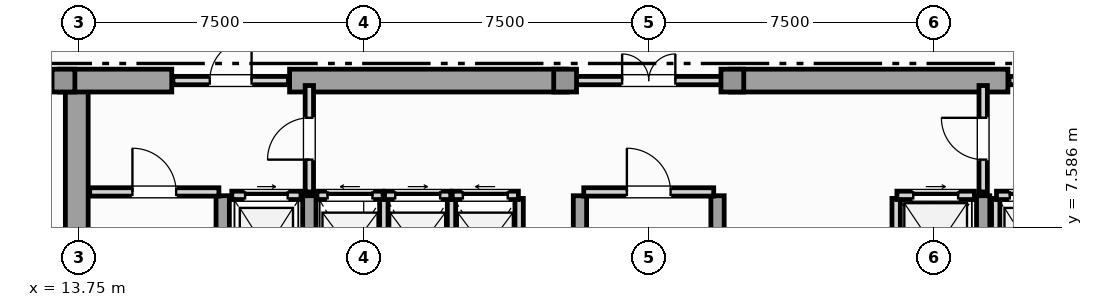
"""IFC4 building model, lengths in metres.
Left out: names, types, materials, properties, quantities, classifications, styles, units other than length and angle.
Written with IfcOpenShell. Run it as: python <this file> out.ifc"""

import sys

from ifc_helpers import new_model, si_unit, direction, frame, frame_2d, origin, origin_2d, place, context, subcontext, project, spatial, rectangle, extrude, element, fill, save


model = new_model("IFC4")
c1 = context("Model", 3, precision=1e-05, world=origin(), true_north=direction((0.0, 1.0)))
c2 = subcontext(c1, "Body", "Model", "MODEL_VIEW")
j1 = project(units=[si_unit("LENGTHUNIT", "METRE"), si_unit("PLANEANGLEUNIT", "RADIAN")], contexts=[c1])
p1 = place(None, origin())
s1 = spatial("IfcSite", under=j1, at=p1, CompositionType="ELEMENT")
p2 = place(p1, origin())
s2 = spatial("IfcBuilding", under=s1, at=p2, CompositionType="ELEMENT")
p3 = place(p2, frame((0.0, 0.0, 268.3)))
s3 = spatial("IfcBuildingStorey", under=s2, at=p3, CompositionType="ELEMENT", Elevation=268.3)
p4 = place(p3, frame((13.7, 0.92, 0.0), z_axis=(0.0, 0.0, 1.0), x_axis=(0.0, 1.0, 0.0)))
e1 = element("IfcWall", 1, at=p4, inside=s3, PredefinedType="SHEAR", context=c2, shape_type="SweptSolid", body=[
    extrude(rectangle(XDim=10.53, YDim=0.6, at=frame_2d((5.265, 0.0))), origin(), (0.0, 0.0, 1.0), 3.65),
])
p5 = place(p3, frame((13.25, 11.45, 0.0), z_axis=(0.0, 0.0, 1.0), x_axis=(1.0, 0.0, 0.0)))
e2 = element("IfcWall", 2, at=p5, inside=s3, PredefinedType="SHEAR", context=c2, shape_type="SweptSolid", body=[
    extrude(rectangle(XDim=2.95, YDim=0.6, at=frame_2d((1.475, 0.0))), origin(), (0.0, 0.0, 1.0), 3.65),
])
for number, where, z_axis, x_axis in (
    (3, (19.3, 11.45, 0.0), (0.0, 0.0, 1.0), (1.0, 0.0, 0.0)),
    (4, (30.9, 11.45, 0.0), (0.0, 0.0, 1.0), (1.0, 0.0, 0.0)),
):
    element("IfcWall", number, at=place(p3, frame(where, z_axis=z_axis, x_axis=x_axis)), inside=s3, PredefinedType="SHEAR", context=c2, shape_type="SweptSolid", body=[
        extrude(rectangle(XDim=7.3, YDim=0.6, at=frame_2d((3.65, 0.0))), origin(), (0.0, 0.0, 1.0), 3.65),
    ])
for number, where, z_axis, x_axis in (
    (5, (17.54, 0.92, 0.0), (0.0, 0.0, 1.0), (0.0, 1.0, 0.0)),
    (6, (19.82, 0.92, 0.0), (0.0, 0.0, 1.0), (0.0, 1.0, 0.0)),
    (7, (26.94, 0.92, 0.0), (0.0, 0.0, 1.0), (0.0, 1.0, 0.0)),
    (8, (30.56, 0.92, 0.0), (0.0, 0.0, 1.0), (0.0, 1.0, 0.0)),
    (9, (37.55, 0.92, 0.0), (0.0, 0.0, 1.0), (0.0, 1.0, 0.0)),
):
    element("IfcWall", number, at=place(p3, frame(where, z_axis=z_axis, x_axis=x_axis)), inside=s3, PredefinedType="SHEAR", context=c2, shape_type="SweptSolid", body=[
        extrude(rectangle(XDim=7.5, YDim=0.35, at=frame_2d((3.75, 0.0))), origin(), (0.0, 0.0, 1.0), 3.65),
    ])
for number, where, z_axis, x_axis in (
    (10, (13.35, 11.45, 0.0), (0.0, 0.0, 1.0), (1.0, 0.0, 0.0)),
    (11, (26.55, 11.45, 0.0), (0.0, 0.0, 1.0), (1.0, 0.0, 0.0)),
    (12, (30.95, 11.45, 0.0), (0.0, 0.0, 1.0), (1.0, 0.0, 0.0)),
):
    element("IfcColumn", number, at=place(p3, frame(where, z_axis=z_axis, x_axis=x_axis)), inside=s3, PredefinedType="COLUMN", context=c2, shape_type="SweptSolid", body=[
        extrude(rectangle(XDim=0.6, YDim=0.6, at=origin_2d()), origin(), (0.0, 0.0, 1.0), 3.85),
    ])
p6 = place(p3, frame((17.78, 8.43, 0.0), z_axis=(0.0, 0.0, 1.0), x_axis=(1.0, 0.0, 0.0)))
e13 = element("IfcWall", 13, at=p6, inside=s3, PredefinedType="SOLIDWALL", context=c2, shape_type="SweptSolid", body=[
    extrude(rectangle(XDim=1.82, YDim=0.22, at=frame_2d((0.91, 0.0))), origin(), (0.0, 0.0, 1.0), 3.65),
])
p7 = place(p6, frame((0.35, 0.0, 0.0)))
e14 = element("IfcOpeningElement", 14, at=p7, cuts=e13, PredefinedType="OPENING", context=c2, shape_type="SweptSolid", body=[
    extrude(rectangle(XDim=1.12, YDim=2.25, at=frame_2d((0.56, 1.125))), frame((0.0, 0.12, 0.0), z_axis=(0.0, -1.0, 0.0), x_axis=(1.0, 0.0, 0.0)), (0.0, 0.0, 1.0), 0.24),
])
p8 = place(p3, frame((37.88, 5.65, 0.0), z_axis=(0.0, 0.0, 1.0), x_axis=(0.0, 1.0, 0.0)))
e15 = element("IfcWall", 15, at=p8, inside=s3, PredefinedType="SOLIDWALL", context=c2, shape_type="SweptSolid", body=[
    extrude(rectangle(XDim=2.7, YDim=0.22, at=frame_2d((1.35, 0.0))), origin(), (0.0, 0.0, 1.0), 3.65),
])
p9 = place(p3, frame((37.9, 8.43, 0.0), z_axis=(0.0, 0.0, 1.0), x_axis=(1.0, 0.0, 0.0)))
e16 = element("IfcWall", 16, at=p9, inside=s3, PredefinedType="SOLIDWALL", context=c2, shape_type="SweptSolid", body=[
    extrude(rectangle(XDim=1.82, YDim=0.22, at=frame_2d((0.91, 0.0))), origin(), (0.0, 0.0, 1.0), 3.65),
])
p10 = place(p9, frame((0.35, 0.0, 0.0)))
e17 = element("IfcOpeningElement", 17, at=p10, cuts=e16, PredefinedType="OPENING", context=c2, shape_type="SweptSolid", body=[
    extrude(rectangle(XDim=1.12, YDim=2.25, at=frame_2d((0.56, 1.125))), frame((0.0, 0.12, 0.0), z_axis=(0.0, -1.0, 0.0), x_axis=(1.0, 0.0, 0.0)), (0.0, 0.0, 1.0), 0.24),
])
p11 = place(p3, frame((35.26, 5.65, 0.0), z_axis=(0.0, 0.0, 1.0), x_axis=(0.0, 1.0, 0.0)))
e18 = element("IfcWall", 18, at=p11, inside=s3, PredefinedType="SOLIDWALL", context=c2, shape_type="SweptSolid", body=[
    extrude(rectangle(XDim=2.7, YDim=0.22, at=frame_2d((1.35, 0.0))), origin(), (0.0, 0.0, 1.0), 3.65),
])
p12 = place(p3, frame((35.28, 8.43, 0.0), z_axis=(0.0, 0.0, 1.0), x_axis=(1.0, 0.0, 0.0)))
e19 = element("IfcWall", 19, at=p12, inside=s3, PredefinedType="SOLIDWALL", context=c2, shape_type="SweptSolid", body=[
    extrude(rectangle(XDim=2.04, YDim=0.22, at=frame_2d((1.02, 0.0))), origin(), (0.0, 0.0, 1.0), 3.65),
])
p13 = place(p12, frame((0.43, 0.0, 0.0)))
e20 = element("IfcOpeningElement", 20, at=p13, cuts=e19, PredefinedType="OPENING", context=c2, shape_type="SweptSolid", body=[
    extrude(rectangle(XDim=1.18, YDim=2.2, at=frame_2d((0.59, 1.1))), frame((0.0, 0.12, 0.0), z_axis=(0.0, -1.0, 0.0), x_axis=(1.0, 0.0, 0.0)), (0.0, 0.0, 1.0), 0.24),
])
p14 = place(p3, frame((21.78, 5.65, 0.0), z_axis=(0.0, 0.0, 1.0), x_axis=(0.0, 1.0, 0.0)))
e21 = element("IfcWall", 21, at=p14, inside=s3, PredefinedType="SOLIDWALL", context=c2, shape_type="SweptSolid", body=[
    extrude(rectangle(XDim=2.7, YDim=0.22, at=frame_2d((1.35, 0.0))), origin(), (0.0, 0.0, 1.0), 3.65),
])
p15 = place(p3, frame((20.02, 8.43, 0.0), z_axis=(0.0, 0.0, 1.0), x_axis=(1.0, 0.0, 0.0)))
e22 = element("IfcWall", 22, at=p15, inside=s3, PredefinedType="SOLIDWALL", context=c2, shape_type="SweptSolid", body=[
    extrude(rectangle(XDim=1.74, YDim=0.22, at=frame_2d((0.87, 0.0))), origin(), (0.0, 0.0, 1.0), 3.65),
])
p16 = place(p15, frame((0.28, 0.0, 0.0)))
e23 = element("IfcOpeningElement", 23, at=p16, cuts=e22, PredefinedType="OPENING", context=c2, shape_type="SweptSolid", body=[
    extrude(rectangle(XDim=1.18, YDim=2.2, at=frame_2d((0.59, 1.1))), frame((0.0, 0.12, 0.0), z_axis=(0.0, -1.0, 0.0), x_axis=(1.0, 0.0, 0.0)), (0.0, 0.0, 1.0), 0.24),
])
p17 = place(p3, frame((23.56, 5.65, 0.0), z_axis=(0.0, 0.0, 1.0), x_axis=(0.0, 1.0, 0.0)))
e24 = element("IfcWall", 24, at=p17, inside=s3, PredefinedType="SOLIDWALL", context=c2, shape_type="SweptSolid", body=[
    extrude(rectangle(XDim=2.7, YDim=0.22, at=frame_2d((1.35, 0.0))), origin(), (0.0, 0.0, 1.0), 3.65),
])
p18 = place(p3, frame((21.8, 8.43, 0.0), z_axis=(0.0, 0.0, 1.0), x_axis=(1.0, 0.0, 0.0)))
e25 = element("IfcWall", 25, at=p18, inside=s3, PredefinedType="SOLIDWALL", context=c2, shape_type="SweptSolid", body=[
    extrude(rectangle(XDim=1.74, YDim=0.22, at=frame_2d((0.87, 0.0))), origin(), (0.0, 0.0, 1.0), 3.65),
])
p19 = place(p18, frame((0.28, 0.0, 0.0)))
e26 = element("IfcOpeningElement", 26, at=p19, cuts=e25, PredefinedType="OPENING", context=c2, shape_type="SweptSolid", body=[
    extrude(rectangle(XDim=1.18, YDim=2.2, at=frame_2d((0.59, 1.1))), frame((0.0, 0.12, 0.0), z_axis=(0.0, -1.0, 0.0), x_axis=(1.0, 0.0, 0.0)), (0.0, 0.0, 1.0), 0.24),
])
p20 = place(p3, frame((25.34, 5.65, 0.0), z_axis=(0.0, 0.0, 1.0), x_axis=(0.0, 1.0, 0.0)))
e27 = element("IfcWall", 27, at=p20, inside=s3, PredefinedType="SOLIDWALL", context=c2, shape_type="SweptSolid", body=[
    extrude(rectangle(XDim=2.7, YDim=0.22, at=frame_2d((1.35, 0.0))), origin(), (0.0, 0.0, 1.0), 3.65),
])
p21 = place(p3, frame((23.58, 8.43, 0.0), z_axis=(0.0, 0.0, 1.0), x_axis=(1.0, 0.0, 0.0)))
e28 = element("IfcWall", 28, at=p21, inside=s3, PredefinedType="SOLIDWALL", context=c2, shape_type="SweptSolid", body=[
    extrude(rectangle(XDim=1.74, YDim=0.22, at=frame_2d((0.87, 0.0))), origin(), (0.0, 0.0, 1.0), 3.65),
])
p22 = place(p21, frame((0.28, 0.0, 0.0)))
e29 = element("IfcOpeningElement", 29, at=p22, cuts=e28, PredefinedType="OPENING", context=c2, shape_type="SweptSolid", body=[
    extrude(rectangle(XDim=1.18, YDim=2.2, at=frame_2d((0.59, 1.1))), frame((0.0, 0.12, 0.0), z_axis=(0.0, -1.0, 0.0), x_axis=(1.0, 0.0, 0.0)), (0.0, 0.0, 1.0), 0.24),
])
p23 = place(p3, frame((14.04, 8.52, 0.0), z_axis=(0.0, 0.0, 1.0), x_axis=(1.0, 0.0, 0.0)))
e30 = element("IfcWall", 30, at=p23, inside=s3, PredefinedType="SOLIDWALL", context=c2, shape_type="SweptSolid", body=[
    extrude(rectangle(XDim=3.4, YDim=0.22, at=frame_2d((1.7, 0.0))), origin(), (0.0, 0.0, 1.0), 3.65),
])
p24 = place(p23, frame((1.125, 0.0, 0.0)))
e31 = element("IfcOpeningElement", 31, at=p24, cuts=e30, PredefinedType="OPENING", context=c2, shape_type="SweptSolid", body=[
    extrude(rectangle(XDim=1.15, YDim=2.2, at=frame_2d((0.575, 1.1))), frame((0.0, 0.12, 0.0), z_axis=(0.0, -1.0, 0.0), x_axis=(1.0, 0.0, 0.0)), (0.0, 0.0, 1.0), 0.24),
])
p25 = place(p3, frame((27.04, 8.52, 0.0), z_axis=(0.0, 0.0, 1.0), x_axis=(1.0, 0.0, 0.0)))
e32 = element("IfcWall", 32, at=p25, inside=s3, PredefinedType="SOLIDWALL", context=c2, shape_type="SweptSolid", body=[
    extrude(rectangle(XDim=3.42, YDim=0.22, at=frame_2d((1.71, 0.0))), origin(), (0.0, 0.0, 1.0), 3.65),
])
p26 = place(p25, frame((1.135, 0.0, 0.0)))
e33 = element("IfcOpeningElement", 33, at=p26, cuts=e32, PredefinedType="OPENING", context=c2, shape_type="SweptSolid", body=[
    extrude(rectangle(XDim=1.15, YDim=2.2, at=frame_2d((0.575, 1.1))), frame((0.0, 0.12, 0.0), z_axis=(0.0, -1.0, 0.0), x_axis=(1.0, 0.0, 0.0)), (0.0, 0.0, 1.0), 0.24),
])
p27 = place(p3, frame((19.82, 8.52, 0.0), z_axis=(0.0, 0.0, 1.0), x_axis=(0.0, 1.0, 0.0)))
e34 = element("IfcWall", 34, at=p27, inside=s3, PredefinedType="SOLIDWALL", context=c2, shape_type="SweptSolid", body=[
    extrude(rectangle(XDim=2.8, YDim=0.22, at=frame_2d((1.4, 0.0))), origin(), (0.0, 0.0, 1.0), 3.105),
])
p28 = place(p27, frame((0.85, 0.0, 0.0)))
e35 = element("IfcOpeningElement", 35, at=p28, cuts=e34, PredefinedType="OPENING", context=c2, shape_type="SweptSolid", body=[
    extrude(rectangle(XDim=1.1, YDim=2.2, at=frame_2d((0.55, 1.1))), frame((0.0, 0.12, 0.0), z_axis=(0.0, -1.0, 0.0), x_axis=(1.0, 0.0, 0.0)), (0.0, 0.0, 1.0), 0.24),
])
p29 = place(p3, frame((37.55, 8.52, 0.0), z_axis=(0.0, 0.0, 1.0), x_axis=(0.0, 1.0, 0.0)))
e36 = element("IfcWall", 36, at=p29, inside=s3, PredefinedType="SOLIDWALL", context=c2, shape_type="SweptSolid", body=[
    extrude(rectangle(XDim=2.8, YDim=0.22, at=frame_2d((1.4, 0.0))), origin(), (0.0, 0.0, 1.0), 3.105),
])
p30 = place(p29, frame((0.85, 0.0, 0.0)))
e37 = element("IfcOpeningElement", 37, at=p30, cuts=e36, PredefinedType="OPENING", context=c2, shape_type="SweptSolid", body=[
    extrude(rectangle(XDim=1.1, YDim=2.2, at=frame_2d((0.55, 1.1))), frame((0.0, 0.12, 0.0), z_axis=(0.0, -1.0, 0.0), x_axis=(1.0, 0.0, 0.0)), (0.0, 0.0, 1.0), 0.24),
])
p31 = place(p3, frame((16.23, 11.45, 0.0), z_axis=(0.0, 0.0, 1.0), x_axis=(1.0, 0.0, 0.0)))
e38 = element("IfcWall", 38, at=p31, inside=s3, PredefinedType="SOLIDWALL", context=c2, shape_type="SweptSolid", body=[
    extrude(rectangle(XDim=3.04, YDim=0.22, at=frame_2d((1.52, 0.0))), origin(), (0.0, 0.0, 1.0), 3.65),
])
p32 = place(p31, frame((0.97, 0.0, 0.0)))
e39 = element("IfcOpeningElement", 39, at=p32, cuts=e38, PredefinedType="OPENING", context=c2, shape_type="SweptSolid", body=[
    extrude(rectangle(XDim=1.1, YDim=2.2, at=frame_2d((0.55, 1.1))), frame((0.0, 0.12, 0.0), z_axis=(0.0, -1.0, 0.0), x_axis=(1.0, 0.0, 0.0)), (0.0, 0.0, 1.0), 0.24),
])
p33 = place(p3, frame((26.63, 11.45, 0.0), z_axis=(0.0, 0.0, 1.0), x_axis=(1.0, 0.0, 0.0)))
e40 = element("IfcWall", 40, at=p33, inside=s3, PredefinedType="SOLIDWALL", context=c2, shape_type="SweptSolid", body=[
    extrude(rectangle(XDim=4.24, YDim=0.22, at=frame_2d((2.12, 0.0))), origin(), (0.0, 0.0, 1.0), 3.65),
])
p34 = place(p33, frame((1.42, 0.0, 0.0)))
e41 = element("IfcOpeningElement", 41, at=p34, cuts=e40, PredefinedType="OPENING", context=c2, shape_type="SweptSolid", body=[
    extrude(rectangle(XDim=1.4, YDim=2.2, at=frame_2d((0.7, 1.1))), frame((0.0, 0.12, 0.0), z_axis=(0.0, -1.0, 0.0), x_axis=(1.0, 0.0, 0.0)), (0.0, 0.0, 1.0), 0.24),
])
p35 = place(p3, frame((38.23, 11.45, 0.0), z_axis=(0.0, 0.0, 1.0), x_axis=(1.0, 0.0, 0.0)))
e42 = element("IfcWall", 42, at=p35, inside=s3, PredefinedType="SOLIDWALL", context=c2, shape_type="SweptSolid", body=[
    extrude(rectangle(XDim=3.04, YDim=0.22, at=frame_2d((1.52, 0.0))), origin(), (0.0, 0.0, 1.0), 3.65),
])
p36 = place(p35, frame((0.97, 0.0, 0.0)))
e43 = element("IfcOpeningElement", 43, at=p36, cuts=e42, PredefinedType="OPENING", context=c2, shape_type="SweptSolid", body=[
    extrude(rectangle(XDim=1.1, YDim=2.2, at=frame_2d((0.55, 1.1))), frame((0.0, 0.12, 0.0), z_axis=(0.0, -1.0, 0.0), x_axis=(1.0, 0.0, 0.0)), (0.0, 0.0, 1.0), 0.24),
])
p37 = place(p3, frame((8.289, 11.6, 0.0), z_axis=(0.0, 0.0, 1.0), x_axis=(1.0, 0.0, 0.0)))
e44 = element("IfcWall", 44, at=p37, inside=s3, PredefinedType="PARTITIONING", context=c2, shape_type="SweptSolid", body=[
    extrude(rectangle(XDim=4.856, YDim=0.18, at=frame_2d((2.428, 0.0))), origin(), (0.0, 0.0, 1.0), 3.65),
])
p38 = place(p37, frame((1.928, 0.0, 0.0)))
e45 = element("IfcOpeningElement", 45, at=p38, cuts=e44, PredefinedType="OPENING", context=c2, shape_type="SweptSolid", body=[
    extrude(rectangle(XDim=1.0, YDim=2.15, at=frame_2d((0.5, 1.075))), frame((0.0, 0.1, 0.0), z_axis=(0.0, -1.0, 0.0), x_axis=(1.0, 0.0, 0.0)), (0.0, 0.0, 1.0), 0.2),
])
p39 = place(p7, origin())
e46 = element("IfcDoor", 46, at=p39, inside=s3, OperationType="SLIDING_TO_RIGHT", PredefinedType="DOOR", context=c2, shape_type="SweptSolid", body=[
    extrude(rectangle(XDim=1.12, YDim=2.25, at=frame_2d((0.56, 1.125))), frame((0.0, 0.025, 0.0), z_axis=(0.0, -1.0, 0.0), x_axis=(1.0, 0.0, 0.0)), (0.0, 0.0, 1.0), 0.05),
])
fill(e14, e46)
p40 = place(p10, origin())
e47 = element("IfcDoor", 47, at=p40, inside=s3, OperationType="SLIDING_TO_LEFT", PredefinedType="DOOR", context=c2, shape_type="SweptSolid", body=[
    extrude(rectangle(XDim=1.12, YDim=2.25, at=frame_2d((0.56, 1.125))), frame((0.0, 0.025, 0.0), z_axis=(0.0, -1.0, 0.0), x_axis=(1.0, 0.0, 0.0)), (0.0, 0.0, 1.0), 0.05),
])
fill(e17, e47)
p41 = place(p13, origin())
e48 = element("IfcDoor", 48, at=p41, inside=s3, OperationType="SLIDING_TO_RIGHT", PredefinedType="DOOR", context=c2, shape_type="SweptSolid", body=[
    extrude(rectangle(XDim=1.18, YDim=2.2, at=frame_2d((0.59, 1.1))), frame((0.0, 0.025, 0.0), z_axis=(0.0, -1.0, 0.0), x_axis=(1.0, 0.0, 0.0)), (0.0, 0.0, 1.0), 0.05),
])
fill(e20, e48)
p42 = place(p16, origin())
e49 = element("IfcDoor", 49, at=p42, inside=s3, OperationType="SLIDING_TO_LEFT", PredefinedType="DOOR", context=c2, shape_type="SweptSolid", body=[
    extrude(rectangle(XDim=1.18, YDim=2.2, at=frame_2d((0.59, 1.1))), frame((0.0, 0.025, 0.0), z_axis=(0.0, -1.0, 0.0), x_axis=(1.0, 0.0, 0.0)), (0.0, 0.0, 1.0), 0.05),
])
fill(e23, e49)
p43 = place(p19, origin())
e50 = element("IfcDoor", 50, at=p43, inside=s3, OperationType="SLIDING_TO_RIGHT", PredefinedType="DOOR", context=c2, shape_type="SweptSolid", body=[
    extrude(rectangle(XDim=1.18, YDim=2.2, at=frame_2d((0.59, 1.1))), frame((0.0, 0.025, 0.0), z_axis=(0.0, -1.0, 0.0), x_axis=(1.0, 0.0, 0.0)), (0.0, 0.0, 1.0), 0.05),
])
fill(e26, e50)
p44 = place(p22, origin())
e51 = element("IfcDoor", 51, at=p44, inside=s3, OperationType="SLIDING_TO_LEFT", PredefinedType="DOOR", context=c2, shape_type="SweptSolid", body=[
    extrude(rectangle(XDim=1.18, YDim=2.2, at=frame_2d((0.59, 1.1))), frame((0.0, 0.025, 0.0), z_axis=(0.0, -1.0, 0.0), x_axis=(1.0, 0.0, 0.0)), (0.0, 0.0, 1.0), 0.05),
])
fill(e29, e51)
p45 = place(p24, origin())
e52 = element("IfcDoor", 52, at=p45, inside=s3, OperationType="SINGLE_SWING_LEFT", PredefinedType="DOOR", context=c2, shape_type="SweptSolid", body=[
    extrude(rectangle(XDim=1.15, YDim=2.2, at=frame_2d((0.575, 1.1))), frame((0.0, 0.025, 0.0), z_axis=(0.0, -1.0, 0.0), x_axis=(1.0, 0.0, 0.0)), (0.0, 0.0, 1.0), 0.05),
])
fill(e31, e52)
p46 = place(p26, origin())
e53 = element("IfcDoor", 53, at=p46, inside=s3, OperationType="SINGLE_SWING_LEFT", PredefinedType="DOOR", context=c2, shape_type="SweptSolid", body=[
    extrude(rectangle(XDim=1.15, YDim=2.2, at=frame_2d((0.575, 1.1))), frame((0.0, 0.025, 0.0), z_axis=(0.0, -1.0, 0.0), x_axis=(1.0, 0.0, 0.0)), (0.0, 0.0, 1.0), 0.05),
])
fill(e33, e53)
p47 = place(p28, origin())
e54 = element("IfcDoor", 54, at=p47, inside=s3, OperationType="SINGLE_SWING_LEFT", PredefinedType="DOOR", context=c2, shape_type="SweptSolid", body=[
    extrude(rectangle(XDim=1.1, YDim=2.2, at=frame_2d((0.55, 1.1))), frame((0.0, 0.025, 0.0), z_axis=(0.0, -1.0, 0.0), x_axis=(1.0, 0.0, 0.0)), (0.0, 0.0, 1.0), 0.05),
])
fill(e35, e54)
p48 = place(p30, origin())
e55 = element("IfcDoor", 55, at=p48, inside=s3, OperationType="SINGLE_SWING_RIGHT", PredefinedType="DOOR", context=c2, shape_type="SweptSolid", body=[
    extrude(rectangle(XDim=1.1, YDim=2.2, at=frame_2d((0.55, 1.1))), frame((0.0, 0.025, 0.0), z_axis=(0.0, -1.0, 0.0), x_axis=(1.0, 0.0, 0.0)), (0.0, 0.0, 1.0), 0.05),
])
fill(e37, e55)
p49 = place(p32, origin())
e56 = element("IfcDoor", 56, at=p49, inside=s3, OperationType="SINGLE_SWING_RIGHT", PredefinedType="DOOR", context=c2, shape_type="SweptSolid", body=[
    extrude(rectangle(XDim=1.1, YDim=2.2, at=frame_2d((0.55, 1.1))), frame((0.0, 0.025, 0.0), z_axis=(0.0, -1.0, 0.0), x_axis=(1.0, 0.0, 0.0)), (0.0, 0.0, 1.0), 0.05),
])
fill(e39, e56)
p50 = place(p34, origin())
e57 = element("IfcDoor", 57, at=p50, inside=s3, OperationType="DOUBLE_DOOR_SINGLE_SWING", PredefinedType="DOOR", context=c2, shape_type="SweptSolid", body=[
    extrude(rectangle(XDim=1.4, YDim=2.2, at=frame_2d((0.7, 1.1))), frame((0.0, 0.025, 0.0), z_axis=(0.0, -1.0, 0.0), x_axis=(1.0, 0.0, 0.0)), (0.0, 0.0, 1.0), 0.05),
])
fill(e41, e57)
save(model, sys.argv[1])
